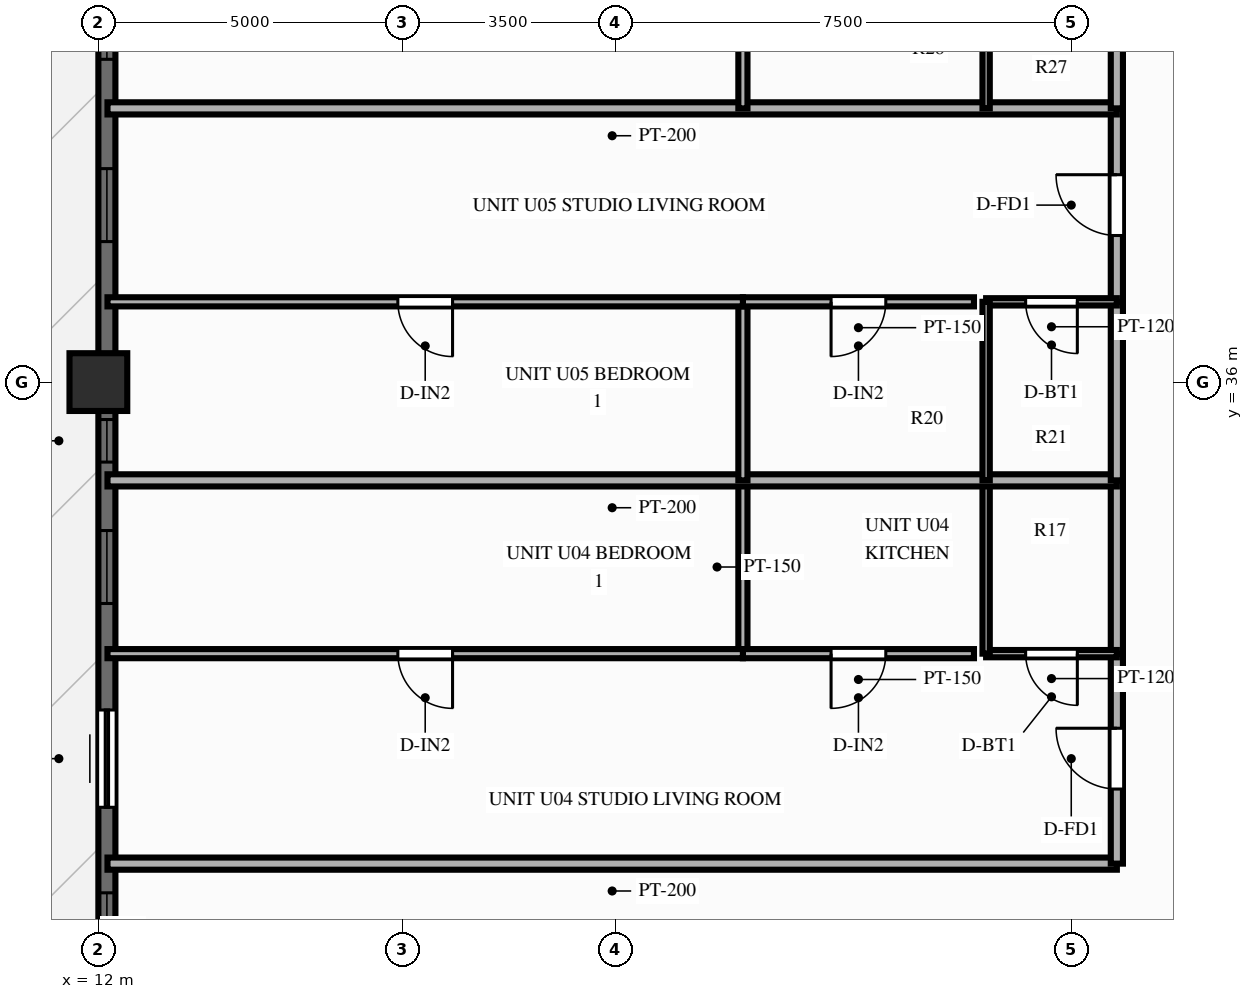
"""IFC4 building model, lengths in metres.
Left out: names, types, materials, properties, quantities, classifications, styles, units other than length and angle.
Written with IfcOpenShell. Run it as: python <this file> out.ifc"""

import sys

from ifc_helpers import new_model, si_unit, direction, frame, frame_2d, origin, origin_2d, place, context, subcontext, project, spatial, rectangle, extrude, source, transform, mapped, element, fill, save


model = new_model("IFC4")
c1 = context("Model", 3, precision=1e-05, world=origin(), true_north=direction((0.0, 1.0)))
c2 = subcontext(c1, "Body", "Model", "MODEL_VIEW")
j1 = project(units=[si_unit("LENGTHUNIT", "METRE"), si_unit("PLANEANGLEUNIT", "RADIAN")], contexts=[c1])
p1 = place(None, origin())
s1 = spatial("IfcSite", under=j1, at=p1, CompositionType="ELEMENT")
p2 = place(p1, origin())
s2 = spatial("IfcBuilding", under=s1, at=p2, CompositionType="ELEMENT")
p3 = place(p2, frame((0.0, 0.0, 92.85)))
s3 = spatial("IfcBuildingStorey", under=s2, at=p3, CompositionType="ELEMENT", Elevation=92.85)
m1 = source(origin(), c2, "Body", "SweptSolid", [
    extrude(rectangle(XDim=0.95, YDim=0.95, at=origin_2d()), origin(), (0.0, 0.0, 1.0), 3.0),
])
p4 = place(p3, frame((12.0, 36.0, 0.0), z_axis=(0.0, 0.0, 1.0), x_axis=(1.0, 0.0, 0.0)))
e1 = element("IfcColumn", 1, at=p4, inside=s3, PredefinedType="COLUMN", context=c2, shape_type="MappedRepresentation", body=[
    mapped(m1, transform((0.0, 0.0, 0.0), scale=1.0)),
])
p5 = place(p3, frame((12.14, 7.2, 0.0), z_axis=(0.0, 0.0, 1.0), x_axis=(0.0, 1.0, 0.0)))
e2 = element("IfcWall", 2, at=p5, inside=s3, PredefinedType="SOLIDWALL", context=c2, shape_type="SweptSolid", body=[
    extrude(rectangle(XDim=39.6, YDim=0.28, at=frame_2d((19.8, 0.0))), origin(), (0.0, 0.0, 1.0), 2.28),
])
p6 = place(p5, frame((1.374, 0.0, 0.25)))
e3 = element("IfcOpeningElement", 3, at=p6, cuts=e2, PredefinedType="OPENING", context=c2, shape_type="SweptSolid", body=[
    extrude(rectangle(XDim=1.2, YDim=1.5, at=frame_2d((0.6, 0.75))), frame((0.0, 0.152, 0.0), z_axis=(0.0, -1.0, 0.0), x_axis=(1.0, 0.0, 0.0)), (0.0, 0.0, 1.0), 0.304),
])
p7 = place(p5, frame((4.458, 0.0, 0.25)))
e4 = element("IfcOpeningElement", 4, at=p7, cuts=e2, PredefinedType="OPENING", context=c2, shape_type="SweptSolid", body=[
    extrude(rectangle(XDim=1.2, YDim=1.5, at=frame_2d((0.6, 0.75))), frame((0.0, 0.152, 0.0), z_axis=(0.0, -1.0, 0.0), x_axis=(1.0, 0.0, 0.0)), (0.0, 0.0, 1.0), 0.304),
])
p8 = place(p5, frame((7.382, 0.0, 0.25)))
e5 = element("IfcOpeningElement", 5, at=p8, cuts=e2, PredefinedType="OPENING", context=c2, shape_type="SweptSolid", body=[
    extrude(rectangle(XDim=1.2, YDim=1.5, at=frame_2d((0.6, 0.75))), frame((0.0, 0.152, 0.0), z_axis=(0.0, -1.0, 0.0), x_axis=(1.0, 0.0, 0.0)), (0.0, 0.0, 1.0), 0.304),
])
p9 = place(p5, frame((11.508, 0.0, 0.25)))
e6 = element("IfcOpeningElement", 6, at=p9, cuts=e2, PredefinedType="OPENING", context=c2, shape_type="SweptSolid", body=[
    extrude(rectangle(XDim=0.7, YDim=1.5, at=frame_2d((0.35, 0.75))), frame((0.0, 0.152, 0.0), z_axis=(0.0, -1.0, 0.0), x_axis=(1.0, 0.0, 0.0)), (0.0, 0.0, 1.0), 0.304),
])
p10 = place(p5, frame((13.409, 0.0, 0.25)))
e7 = element("IfcOpeningElement", 7, at=p10, cuts=e2, PredefinedType="OPENING", context=c2, shape_type="SweptSolid", body=[
    extrude(rectangle(XDim=1.2, YDim=1.5, at=frame_2d((0.6, 0.75))), frame((0.0, 0.152, 0.0), z_axis=(0.0, -1.0, 0.0), x_axis=(1.0, 0.0, 0.0)), (0.0, 0.0, 1.0), 0.304),
])
p11 = place(p5, frame((16.468, 0.0, 0.25)))
e8 = element("IfcOpeningElement", 8, at=p11, cuts=e2, PredefinedType="OPENING", context=c2, shape_type="SweptSolid", body=[
    extrude(rectangle(XDim=1.2, YDim=1.5, at=frame_2d((0.6, 0.75))), frame((0.0, 0.152, 0.0), z_axis=(0.0, -1.0, 0.0), x_axis=(1.0, 0.0, 0.0)), (0.0, 0.0, 1.0), 0.304),
])
p12 = place(p5, frame((19.2, 0.0, 0.25)))
e9 = element("IfcOpeningElement", 9, at=p12, cuts=e2, PredefinedType="OPENING", context=c2, shape_type="SweptSolid", body=[
    extrude(rectangle(XDim=1.2, YDim=1.5, at=frame_2d((0.6, 0.75))), frame((0.0, 0.152, 0.0), z_axis=(0.0, -1.0, 0.0), x_axis=(1.0, 0.0, 0.0)), (0.0, 0.0, 1.0), 0.304),
])
p13 = place(p5, frame((21.807, 0.0, 0.0)))
e10 = element("IfcOpeningElement", 10, at=p13, cuts=e2, PredefinedType="OPENING", context=c2, shape_type="SweptSolid", body=[
    extrude(rectangle(XDim=1.6, YDim=2.15, at=frame_2d((0.8, 1.075))), frame((0.0, 0.152, 0.0), z_axis=(0.0, -1.0, 0.0), x_axis=(1.0, 0.0, 0.0)), (0.0, 0.0, 1.0), 0.304),
])
p14 = place(p5, frame((25.159, 0.0, 0.25)))
e11 = element("IfcOpeningElement", 11, at=p14, cuts=e2, PredefinedType="OPENING", context=c2, shape_type="SweptSolid", body=[
    extrude(rectangle(XDim=1.2, YDim=1.5, at=frame_2d((0.6, 0.75))), frame((0.0, 0.152, 0.0), z_axis=(0.0, -1.0, 0.0), x_axis=(1.0, 0.0, 0.0)), (0.0, 0.0, 1.0), 0.304),
])
p15 = place(p5, frame((27.484, 0.0, 0.25)))
e12 = element("IfcOpeningElement", 12, at=p15, cuts=e2, PredefinedType="OPENING", context=c2, shape_type="SweptSolid", body=[
    extrude(rectangle(XDim=0.7, YDim=1.5, at=frame_2d((0.35, 0.75))), frame((0.0, 0.152, 0.0), z_axis=(0.0, -1.0, 0.0), x_axis=(1.0, 0.0, 0.0)), (0.0, 0.0, 1.0), 0.304),
])
p16 = place(p5, frame((31.111, 0.0, 0.25)))
e13 = element("IfcOpeningElement", 13, at=p16, cuts=e2, PredefinedType="OPENING", context=c2, shape_type="SweptSolid", body=[
    extrude(rectangle(XDim=1.2, YDim=1.5, at=frame_2d((0.6, 0.75))), frame((0.0, 0.152, 0.0), z_axis=(0.0, -1.0, 0.0), x_axis=(1.0, 0.0, 0.0)), (0.0, 0.0, 1.0), 0.304),
])
p17 = place(p5, frame((34.109, 0.0, 0.25)))
e14 = element("IfcOpeningElement", 14, at=p17, cuts=e2, PredefinedType="OPENING", context=c2, shape_type="SweptSolid", body=[
    extrude(rectangle(XDim=1.2, YDim=1.5, at=frame_2d((0.6, 0.75))), frame((0.0, 0.152, 0.0), z_axis=(0.0, -1.0, 0.0), x_axis=(1.0, 0.0, 0.0)), (0.0, 0.0, 1.0), 0.304),
])
p18 = place(p5, frame((37.101, 0.0, 0.25)))
e15 = element("IfcOpeningElement", 15, at=p18, cuts=e2, PredefinedType="OPENING", context=c2, shape_type="SweptSolid", body=[
    extrude(rectangle(XDim=1.2, YDim=1.5, at=frame_2d((0.6, 0.75))), frame((0.0, 0.152, 0.0), z_axis=(0.0, -1.0, 0.0), x_axis=(1.0, 0.0, 0.0)), (0.0, 0.0, 1.0), 0.304),
])
p19 = place(p3, frame((28.75, 28.08, 0.0), z_axis=(0.0, 0.0, 1.0), x_axis=(-1.0, 0.0, 0.0)))
e16 = element("IfcWall", 16, at=p19, inside=s3, PredefinedType="PARTITIONING", context=c2, shape_type="SweptSolid", body=[
    extrude(rectangle(XDim=16.6, YDim=0.2, at=frame_2d((8.3, 0.0))), origin(), (0.0, 0.0, 1.0), 2.79),
])
p20 = place(p3, frame((28.75, 28.08, 0.0), z_axis=(0.0, 0.0, 1.0), x_axis=(0.0, 1.0, 0.0)))
e17 = element("IfcWall", 17, at=p20, inside=s3, PredefinedType="PARTITIONING", context=c2, shape_type="SweptSolid", body=[
    extrude(rectangle(XDim=3.454, YDim=0.2, at=frame_2d((1.727, 0.0))), origin(), (0.0, 0.0, 1.0), 2.79),
])
p21 = place(p20, frame((1.227, 0.0, 0.0)))
e18 = element("IfcOpeningElement", 18, at=p21, cuts=e17, PredefinedType="OPENING", context=c2, shape_type="SweptSolid", body=[
    extrude(rectangle(XDim=1.0, YDim=2.15, at=frame_2d((0.5, 1.075))), frame((0.0, 0.112, 0.0), z_axis=(0.0, -1.0, 0.0), x_axis=(1.0, 0.0, 0.0)), (0.0, 0.0, 1.0), 0.224),
])
p22 = place(p3, frame((28.75, 31.534, 0.0), z_axis=(0.0, 0.0, 1.0), x_axis=(0.0, 1.0, 0.0)))
e19 = element("IfcWall", 19, at=p22, inside=s3, PredefinedType="PARTITIONING", context=c2, shape_type="SweptSolid", body=[
    extrude(rectangle(XDim=2.85, YDim=0.2, at=frame_2d((1.425, 0.0))), origin(), (0.0, 0.0, 1.0), 2.79),
])
p23 = place(p3, frame((28.75, 31.534, 0.0), z_axis=(0.0, 0.0, 1.0), x_axis=(-1.0, 0.0, 0.0)))
e20 = element("IfcWall", 20, at=p23, inside=s3, PredefinedType="PARTITIONING", context=c2, shape_type="SweptSolid", body=[
    extrude(rectangle(XDim=2.15, YDim=0.12, at=frame_2d((1.075, 0.0))), origin(), (0.0, 0.0, 1.0), 2.79),
])
p24 = place(p23, frame((0.65, 0.0, 0.0)))
e21 = element("IfcOpeningElement", 21, at=p24, cuts=e20, PredefinedType="OPENING", context=c2, shape_type="SweptSolid", body=[
    extrude(rectangle(XDim=0.85, YDim=2.05, at=frame_2d((0.425, 1.025))), frame((0.0, 0.072, 0.0), z_axis=(0.0, -1.0, 0.0), x_axis=(1.0, 0.0, 0.0)), (0.0, 0.0, 1.0), 0.144),
])
p25 = place(p3, frame((26.6, 31.534, 0.0), z_axis=(0.0, 0.0, 1.0), x_axis=(0.0, 1.0, 0.0)))
e22 = element("IfcWall", 22, at=p25, inside=s3, PredefinedType="PARTITIONING", context=c2, shape_type="SweptSolid", body=[
    extrude(rectangle(XDim=2.85, YDim=0.12, at=frame_2d((1.425, 0.0))), origin(), (0.0, 0.0, 1.0), 2.79),
])
p26 = place(p3, frame((22.6, 31.534, 0.0), z_axis=(0.0, 0.0, 1.0), x_axis=(0.0, 1.0, 0.0)))
e23 = element("IfcWall", 23, at=p26, inside=s3, PredefinedType="PARTITIONING", context=c2, shape_type="SweptSolid", body=[
    extrude(rectangle(XDim=2.85, YDim=0.15, at=frame_2d((1.425, 0.0))), origin(), (0.0, 0.0, 1.0), 2.79),
])
p27 = place(p3, frame((26.4, 31.534, 0.0), z_axis=(0.0, 0.0, 1.0), x_axis=(-1.0, 0.0, 0.0)))
e24 = element("IfcWall", 24, at=p27, inside=s3, PredefinedType="PARTITIONING", context=c2, shape_type="SweptSolid", body=[
    extrude(rectangle(XDim=3.8, YDim=0.15, at=frame_2d((1.9, 0.0))), origin(), (0.0, 0.0, 1.0), 2.79),
])
p28 = place(p27, frame((1.45, 0.0, 0.0)))
e25 = element("IfcOpeningElement", 25, at=p28, cuts=e24, PredefinedType="OPENING", context=c2, shape_type="SweptSolid", body=[
    extrude(rectangle(XDim=0.9, YDim=2.1, at=frame_2d((0.45, 1.05))), frame((0.0, 0.087, 0.0), z_axis=(0.0, -1.0, 0.0), x_axis=(1.0, 0.0, 0.0)), (0.0, 0.0, 1.0), 0.174),
])
p29 = place(p3, frame((22.6, 31.534, 0.0), z_axis=(0.0, 0.0, 1.0), x_axis=(-1.0, 0.0, 0.0)))
e26 = element("IfcWall", 26, at=p29, inside=s3, PredefinedType="PARTITIONING", context=c2, shape_type="SweptSolid", body=[
    extrude(rectangle(XDim=10.45, YDim=0.15, at=frame_2d((5.225, 0.0))), origin(), (0.0, 0.0, 1.0), 2.79),
])
p30 = place(p29, frame((4.775, 0.0, 0.0)))
e27 = element("IfcOpeningElement", 27, at=p30, cuts=e26, PredefinedType="OPENING", context=c2, shape_type="SweptSolid", body=[
    extrude(rectangle(XDim=0.9, YDim=2.1, at=frame_2d((0.45, 1.05))), frame((0.0, 0.087, 0.0), z_axis=(0.0, -1.0, 0.0), x_axis=(1.0, 0.0, 0.0)), (0.0, 0.0, 1.0), 0.174),
])
p31 = place(p3, frame((28.75, 34.384, 0.0), z_axis=(0.0, 0.0, 1.0), x_axis=(-1.0, 0.0, 0.0)))
e28 = element("IfcWall", 28, at=p31, inside=s3, PredefinedType="PARTITIONING", context=c2, shape_type="SweptSolid", body=[
    extrude(rectangle(XDim=16.6, YDim=0.2, at=frame_2d((8.3, 0.0))), origin(), (0.0, 0.0, 1.0), 2.79),
])
p32 = place(p3, frame((28.75, 34.384, 0.0), z_axis=(0.0, 0.0, 1.0), x_axis=(0.0, 1.0, 0.0)))
e29 = element("IfcWall", 29, at=p32, inside=s3, PredefinedType="PARTITIONING", context=c2, shape_type="SweptSolid", body=[
    extrude(rectangle(XDim=2.937, YDim=0.2, at=frame_2d((1.468, 0.0))), origin(), (0.0, 0.0, 1.0), 2.79),
])
p33 = place(p3, frame((28.75, 37.32, 0.0), z_axis=(0.0, 0.0, 1.0), x_axis=(0.0, 1.0, 0.0)))
e30 = element("IfcWall", 30, at=p33, inside=s3, PredefinedType="PARTITIONING", context=c2, shape_type="SweptSolid", body=[
    extrude(rectangle(XDim=3.182, YDim=0.2, at=frame_2d((1.591, 0.0))), origin(), (0.0, 0.0, 1.0), 2.79),
])
p34 = place(p33, frame((1.091, 0.0, 0.0)))
e31 = element("IfcOpeningElement", 31, at=p34, cuts=e30, PredefinedType="OPENING", context=c2, shape_type="SweptSolid", body=[
    extrude(rectangle(XDim=1.0, YDim=2.15, at=frame_2d((0.5, 1.075))), frame((0.0, 0.112, 0.0), z_axis=(0.0, -1.0, 0.0), x_axis=(1.0, 0.0, 0.0)), (0.0, 0.0, 1.0), 0.224),
])
p35 = place(p3, frame((28.75, 37.32, 0.0), z_axis=(0.0, 0.0, 1.0), x_axis=(-1.0, 0.0, 0.0)))
e32 = element("IfcWall", 32, at=p35, inside=s3, PredefinedType="PARTITIONING", context=c2, shape_type="SweptSolid", body=[
    extrude(rectangle(XDim=2.15, YDim=0.12, at=frame_2d((1.075, 0.0))), origin(), (0.0, 0.0, 1.0), 2.79),
])
p36 = place(p35, frame((0.65, 0.0, 0.0)))
e33 = element("IfcOpeningElement", 33, at=p36, cuts=e32, PredefinedType="OPENING", context=c2, shape_type="SweptSolid", body=[
    extrude(rectangle(XDim=0.85, YDim=2.05, at=frame_2d((0.425, 1.025))), frame((0.0, 0.072, 0.0), z_axis=(0.0, -1.0, 0.0), x_axis=(1.0, 0.0, 0.0)), (0.0, 0.0, 1.0), 0.144),
])
p37 = place(p3, frame((26.6, 34.384, 0.0), z_axis=(0.0, 0.0, 1.0), x_axis=(0.0, 1.0, 0.0)))
e34 = element("IfcWall", 34, at=p37, inside=s3, PredefinedType="PARTITIONING", context=c2, shape_type="SweptSolid", body=[
    extrude(rectangle(XDim=2.937, YDim=0.12, at=frame_2d((1.468, 0.0))), origin(), (0.0, 0.0, 1.0), 2.79),
])
p38 = place(p3, frame((22.6, 34.384, 0.0), z_axis=(0.0, 0.0, 1.0), x_axis=(0.0, 1.0, 0.0)))
e35 = element("IfcWall", 35, at=p38, inside=s3, PredefinedType="PARTITIONING", context=c2, shape_type="SweptSolid", body=[
    extrude(rectangle(XDim=2.937, YDim=0.15, at=frame_2d((1.468, 0.0))), origin(), (0.0, 0.0, 1.0), 2.79),
])
p39 = place(p3, frame((26.4, 37.32, 0.0), z_axis=(0.0, 0.0, 1.0), x_axis=(-1.0, 0.0, 0.0)))
e36 = element("IfcWall", 36, at=p39, inside=s3, PredefinedType="PARTITIONING", context=c2, shape_type="SweptSolid", body=[
    extrude(rectangle(XDim=3.8, YDim=0.15, at=frame_2d((1.9, 0.0))), origin(), (0.0, 0.0, 1.0), 2.79),
])
p40 = place(p39, frame((1.45, 0.0, 0.0)))
e37 = element("IfcOpeningElement", 37, at=p40, cuts=e36, PredefinedType="OPENING", context=c2, shape_type="SweptSolid", body=[
    extrude(rectangle(XDim=0.9, YDim=2.1, at=frame_2d((0.45, 1.05))), frame((0.0, 0.087, 0.0), z_axis=(0.0, -1.0, 0.0), x_axis=(1.0, 0.0, 0.0)), (0.0, 0.0, 1.0), 0.174),
])
p41 = place(p3, frame((22.6, 37.32, 0.0), z_axis=(0.0, 0.0, 1.0), x_axis=(-1.0, 0.0, 0.0)))
e38 = element("IfcWall", 38, at=p41, inside=s3, PredefinedType="PARTITIONING", context=c2, shape_type="SweptSolid", body=[
    extrude(rectangle(XDim=10.45, YDim=0.15, at=frame_2d((5.225, 0.0))), origin(), (0.0, 0.0, 1.0), 2.79),
])
p42 = place(p41, frame((4.775, 0.0, 0.0)))
e39 = element("IfcOpeningElement", 39, at=p42, cuts=e38, PredefinedType="OPENING", context=c2, shape_type="SweptSolid", body=[
    extrude(rectangle(XDim=0.9, YDim=2.1, at=frame_2d((0.45, 1.05))), frame((0.0, 0.087, 0.0), z_axis=(0.0, -1.0, 0.0), x_axis=(1.0, 0.0, 0.0)), (0.0, 0.0, 1.0), 0.174),
])
p43 = place(p3, frame((28.75, 40.502, 0.0), z_axis=(0.0, 0.0, 1.0), x_axis=(-1.0, 0.0, 0.0)))
e40 = element("IfcWall", 40, at=p43, inside=s3, PredefinedType="PARTITIONING", context=c2, shape_type="SweptSolid", body=[
    extrude(rectangle(XDim=16.6, YDim=0.2, at=frame_2d((8.3, 0.0))), origin(), (0.0, 0.0, 1.0), 2.79),
])
p44 = place(p3, frame((28.75, 40.502, 0.0), z_axis=(0.0, 0.0, 1.0), x_axis=(0.0, 1.0, 0.0)))
e41 = element("IfcWall", 41, at=p44, inside=s3, PredefinedType="PARTITIONING", context=c2, shape_type="SweptSolid", body=[
    extrude(rectangle(XDim=2.814, YDim=0.2, at=frame_2d((1.407, 0.0))), origin(), (0.0, 0.0, 1.0), 2.79),
])
p45 = place(p3, frame((26.6, 40.502, 0.0), z_axis=(0.0, 0.0, 1.0), x_axis=(0.0, 1.0, 0.0)))
e42 = element("IfcWall", 42, at=p45, inside=s3, PredefinedType="PARTITIONING", context=c2, shape_type="SweptSolid", body=[
    extrude(rectangle(XDim=2.814, YDim=0.12, at=frame_2d((1.407, 0.0))), origin(), (0.0, 0.0, 1.0), 2.79),
])
p46 = place(p3, frame((22.6, 40.502, 0.0), z_axis=(0.0, 0.0, 1.0), x_axis=(0.0, 1.0, 0.0)))
e43 = element("IfcWall", 43, at=p46, inside=s3, PredefinedType="PARTITIONING", context=c2, shape_type="SweptSolid", body=[
    extrude(rectangle(XDim=2.814, YDim=0.15, at=frame_2d((1.407, 0.0))), origin(), (0.0, 0.0, 1.0), 2.79),
])
m2 = source(origin(), c2, "Body", "SweptSolid", [
    extrude(rectangle(XDim=1.2, YDim=1.5, at=frame_2d((0.6, 0.75))), frame((0.0, 0.03, 0.0), z_axis=(0.0, -1.0, 0.0), x_axis=(1.0, 0.0, 0.0)), (0.0, 0.0, 1.0), 0.06),
])
p47 = place(p12, origin())
e44 = element("IfcWindow", 44, at=p47, inside=s3, PartitioningType="SINGLE_PANEL", PredefinedType="WINDOW", context=c2, shape_type="MappedRepresentation", body=[
    mapped(m2, transform((0.0, 0.0, 0.0), scale=1.0)),
])
fill(e9, e44)
m3 = source(origin(), c2, "Body", "SweptSolid", [
    extrude(rectangle(XDim=1.6, YDim=2.15, at=frame_2d((0.8, 1.075))), frame((0.0, 0.025, 0.0), z_axis=(0.0, -1.0, 0.0), x_axis=(1.0, 0.0, 0.0)), (0.0, 0.0, 1.0), 0.05),
])
p48 = place(p13, origin())
e45 = element("IfcDoor", 45, at=p48, inside=s3, OperationType="SLIDING_TO_LEFT", PredefinedType="DOOR", context=c2, shape_type="MappedRepresentation", body=[
    mapped(m3, transform((0.0, 0.0, 0.0), scale=1.0)),
])
fill(e10, e45)
p49 = place(p14, origin())
e46 = element("IfcWindow", 46, at=p49, inside=s3, PartitioningType="SINGLE_PANEL", PredefinedType="WINDOW", context=c2, shape_type="MappedRepresentation", body=[
    mapped(m2, transform((0.0, 0.0, 0.0), scale=1.0)),
])
fill(e11, e46)
m4 = source(origin(), c2, "Body", "SweptSolid", [
    extrude(rectangle(XDim=0.7, YDim=1.5, at=frame_2d((0.35, 0.75))), frame((0.0, 0.03, 0.0), z_axis=(0.0, -1.0, 0.0), x_axis=(1.0, 0.0, 0.0)), (0.0, 0.0, 1.0), 0.06),
])
p50 = place(p15, origin())
e47 = element("IfcWindow", 47, at=p50, inside=s3, PartitioningType="SINGLE_PANEL", PredefinedType="WINDOW", context=c2, shape_type="MappedRepresentation", body=[
    mapped(m4, transform((0.0, 0.0, 0.0), scale=1.0)),
])
fill(e12, e47)
p51 = place(p16, origin())
e48 = element("IfcWindow", 48, at=p51, inside=s3, PartitioningType="SINGLE_PANEL", PredefinedType="WINDOW", context=c2, shape_type="MappedRepresentation", body=[
    mapped(m2, transform((0.0, 0.0, 0.0), scale=1.0)),
])
fill(e13, e48)
p52 = place(p17, origin())
e49 = element("IfcWindow", 49, at=p52, inside=s3, PartitioningType="SINGLE_PANEL", PredefinedType="WINDOW", context=c2, shape_type="MappedRepresentation", body=[
    mapped(m2, transform((0.0, 0.0, 0.0), scale=1.0)),
])
fill(e14, e49)
m5 = source(origin(), c2, "Body", "SweptSolid", [
    extrude(rectangle(XDim=1.0, YDim=2.15, at=frame_2d((0.5, 1.075))), frame((0.0, 0.025, 0.0), z_axis=(0.0, -1.0, 0.0), x_axis=(1.0, 0.0, 0.0)), (0.0, 0.0, 1.0), 0.05),
])
p53 = place(p21, origin())
e50 = element("IfcDoor", 50, at=p53, inside=s3, OperationType="SINGLE_SWING_RIGHT", PredefinedType="DOOR", context=c2, shape_type="MappedRepresentation", body=[
    mapped(m5, transform((0.0, 0.0, 0.0), scale=1.0)),
])
fill(e18, e50)
m6 = source(origin(), c2, "Body", "SweptSolid", [
    extrude(rectangle(XDim=0.85, YDim=2.05, at=frame_2d((0.425, 1.025))), frame((0.0, 0.025, 0.0), z_axis=(0.0, -1.0, 0.0), x_axis=(1.0, 0.0, 0.0)), (0.0, 0.0, 1.0), 0.05),
])
p54 = place(p24, origin())
e51 = element("IfcDoor", 51, at=p54, inside=s3, OperationType="SINGLE_SWING_LEFT", PredefinedType="DOOR", context=c2, shape_type="MappedRepresentation", body=[
    mapped(m6, transform((0.0, 0.0, 0.0), scale=1.0)),
])
fill(e21, e51)
m7 = source(origin(), c2, "Body", "SweptSolid", [
    extrude(rectangle(XDim=0.9, YDim=2.1, at=frame_2d((0.45, 1.05))), frame((0.0, 0.025, 0.0), z_axis=(0.0, -1.0, 0.0), x_axis=(1.0, 0.0, 0.0)), (0.0, 0.0, 1.0), 0.05),
])
p55 = place(p28, origin())
e52 = element("IfcDoor", 52, at=p55, inside=s3, OperationType="SINGLE_SWING_RIGHT", PredefinedType="DOOR", context=c2, shape_type="MappedRepresentation", body=[
    mapped(m7, transform((0.0, 0.0, 0.0), scale=1.0)),
])
fill(e25, e52)
p56 = place(p30, origin())
e53 = element("IfcDoor", 53, at=p56, inside=s3, OperationType="SINGLE_SWING_LEFT", PredefinedType="DOOR", context=c2, shape_type="MappedRepresentation", body=[
    mapped(m7, transform((0.0, 0.0, 0.0), scale=1.0)),
])
fill(e27, e53)
p57 = place(p34, origin())
e54 = element("IfcDoor", 54, at=p57, inside=s3, OperationType="SINGLE_SWING_RIGHT", PredefinedType="DOOR", context=c2, shape_type="MappedRepresentation", body=[
    mapped(m5, transform((0.0, 0.0, 0.0), scale=1.0)),
])
fill(e31, e54)
p58 = place(p36, origin())
e55 = element("IfcDoor", 55, at=p58, inside=s3, OperationType="SINGLE_SWING_LEFT", PredefinedType="DOOR", context=c2, shape_type="MappedRepresentation", body=[
    mapped(m6, transform((0.0, 0.0, 0.0), scale=1.0)),
])
fill(e33, e55)
p59 = place(p40, origin())
e56 = element("IfcDoor", 56, at=p59, inside=s3, OperationType="SINGLE_SWING_RIGHT", PredefinedType="DOOR", context=c2, shape_type="MappedRepresentation", body=[
    mapped(m7, transform((0.0, 0.0, 0.0), scale=1.0)),
])
fill(e37, e56)
p60 = place(p42, origin())
e57 = element("IfcDoor", 57, at=p60, inside=s3, OperationType="SINGLE_SWING_LEFT", PredefinedType="DOOR", context=c2, shape_type="MappedRepresentation", body=[
    mapped(m7, transform((0.0, 0.0, 0.0), scale=1.0)),
])
fill(e39, e57)
save(model, sys.argv[1])
